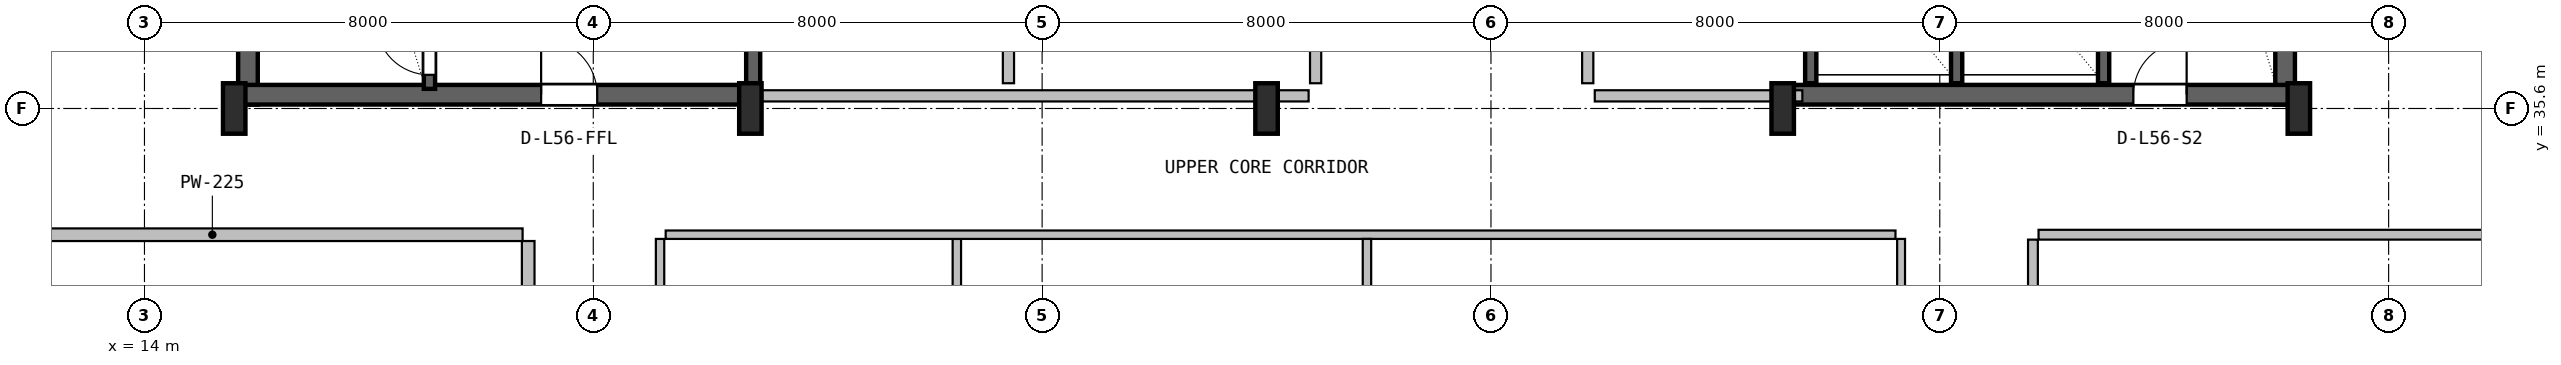
"""IFC4 building model, lengths in metres.
Left out: names, types, materials, properties, quantities, classifications, styles, units other than length and angle.
Written with IfcOpenShell. Run it as: python <this file> out.ifc"""

import sys

from ifc_helpers import new_model, si_unit, direction, frame, frame_2d, origin, origin_2d, place, context, subcontext, project, spatial, rectangle, i_section, extrude, source, transform, mapped, element, fill, save


model = new_model("IFC4")
c1 = context("Model", 3, precision=1e-05, world=origin(), true_north=direction((0.0, 1.0)))
c2 = subcontext(c1, "Body", "Model", "MODEL_VIEW")
j1 = project(units=[si_unit("LENGTHUNIT", "METRE"), si_unit("PLANEANGLEUNIT", "RADIAN")], contexts=[c1])
p1 = place(None, origin())
s1 = spatial("IfcSite", under=j1, at=p1, CompositionType="ELEMENT")
p2 = place(p1, origin())
s2 = spatial("IfcBuilding", under=s1, at=p2, CompositionType="ELEMENT")
p3 = place(p2, frame((0.0, 0.0, 226.4)))
s3 = spatial("IfcBuildingStorey", under=s2, at=p3, CompositionType="ELEMENT", Elevation=226.4)
for number, where, z_axis, x_axis in (
    (1, (15.845, 35.67, 0.0), (0.0, 0.0, 1.0), (0.0, 1.0, 0.0)),
    (2, (52.155, 35.67, 0.0), (0.0, 0.0, 1.0), (0.0, 1.0, 0.0)),
):
    element("IfcWall", number, at=place(p3, frame(where, z_axis=z_axis, x_axis=x_axis)), inside=s3, PredefinedType="SHEAR", context=c2, shape_type="SweptSolid", body=[
        extrude(rectangle(XDim=11.13, YDim=0.35, at=frame_2d((5.565, 0.0))), origin(), (0.0, 0.0, 1.0), 3.55),
    ])
p4 = place(p3, frame((15.67, 35.845, 0.0), z_axis=(0.0, 0.0, 1.0), x_axis=(1.0, 0.0, 0.0)))
e3 = element("IfcWall", 3, at=p4, inside=s3, PredefinedType="SHEAR", context=c2, shape_type="SweptSolid", body=[
    extrude(rectangle(XDim=9.13, YDim=0.35, at=frame_2d((4.565, 0.0))), origin(), (0.0, 0.0, 1.0), 3.55),
])
p5 = place(p4, frame((5.4, 0.0, 0.0)))
e4 = element("IfcOpeningElement", 4, at=p5, cuts=e3, PredefinedType="OPENING", context=c2, shape_type="SweptSolid", body=[
    extrude(rectangle(XDim=1.0, YDim=2.1, at=frame_2d((0.5, 1.05))), frame((0.0, 0.185, 0.0), z_axis=(0.0, -1.0, 0.0), x_axis=(1.0, 0.0, 0.0)), (0.0, 0.0, 1.0), 0.37),
])
p6 = place(p3, frame((43.2, 35.845, 0.0), z_axis=(0.0, 0.0, 1.0), x_axis=(1.0, 0.0, 0.0)))
e5 = element("IfcWall", 5, at=p6, inside=s3, PredefinedType="SHEAR", context=c2, shape_type="SweptSolid", body=[
    extrude(rectangle(XDim=9.13, YDim=0.35, at=frame_2d((4.565, 0.0))), origin(), (0.0, 0.0, 1.0), 3.55),
])
p7 = place(p6, frame((6.25, 0.0, 0.0)))
e6 = element("IfcOpeningElement", 6, at=p7, cuts=e5, PredefinedType="OPENING", context=c2, shape_type="SweptSolid", body=[
    extrude(rectangle(XDim=0.95, YDim=2.1, at=frame_2d((0.475, 1.05))), frame((0.0, 0.185, 0.0), z_axis=(0.0, -1.0, 0.0), x_axis=(1.0, 0.0, 0.0)), (0.0, 0.0, 1.0), 0.37),
])
m1 = source(origin(), c2, "Body", "SweptSolid", [
    extrude(i_section(OverallWidth=0.4, OverallDepth=0.9, WebThickness=0.016, FlangeThickness=0.028, FilletRadius=0.016, at=origin_2d()), origin(), (0.0, 0.0, 1.0), 3.8),
])
for number, where, z_axis, x_axis in (
    (7, (15.6, 35.6, 0.0), (0.0, 0.0, 1.0), (1.0, 0.0, 0.0)),
    (8, (24.8, 35.6, 0.0), (0.0, 0.0, 1.0), (1.0, 0.0, 0.0)),
    (9, (34.0, 35.6, 0.0), (0.0, 0.0, 1.0), (1.0, 0.0, 0.0)),
    (10, (43.2, 35.6, 0.0), (0.0, 0.0, 1.0), (1.0, 0.0, 0.0)),
    (11, (52.4, 35.6, 0.0), (0.0, 0.0, 1.0), (1.0, 0.0, 0.0)),
):
    element("IfcColumn", number, at=place(p3, frame(where, z_axis=z_axis, x_axis=x_axis)), inside=s3, PredefinedType="COLUMN", context=c2, shape_type="MappedRepresentation", body=[
        mapped(m1, transform((0.0, 0.0, 0.0), x_axis=(1.0, 0.0, 0.0), y_axis=(0.0, 1.0, 0.0), z_axis=(0.0, 0.0, 1.0), scale=1.0)),
    ])
p8 = place(p3, frame((19.08, 35.95, 0.0), z_axis=(0.0, 0.0, 1.0), x_axis=(0.0, 1.0, 0.0)))
e12 = element("IfcWall", 12, at=p8, inside=s3, PredefinedType="SHEAR", context=c2, shape_type="SweptSolid", body=[
    extrude(rectangle(XDim=9.65, YDim=0.2, at=frame_2d((4.825, 0.0))), origin(), (0.0, 0.0, 1.0), 3.55),
])
p9 = place(p8, frame((0.25, 0.0, 0.0)))
e13 = element("IfcOpeningElement", 13, at=p9, cuts=e12, PredefinedType="OPENING", context=c2, shape_type="SweptSolid", body=[
    extrude(rectangle(XDim=0.95, YDim=2.1, at=frame_2d((0.475, 1.05))), frame((0.0, 0.11, 0.0), z_axis=(0.0, -1.0, 0.0), x_axis=(1.0, 0.0, 0.0)), (0.0, 0.0, 1.0), 0.22),
])
p10 = place(p3, frame((24.85, 36.05, 0.0), z_axis=(0.0, 0.0, 1.0), x_axis=(0.0, 1.0, 0.0)))
e14 = element("IfcWall", 14, at=p10, inside=s3, PredefinedType="SHEAR", context=c2, shape_type="SweptSolid", body=[
    extrude(rectangle(XDim=10.45, YDim=0.25, at=frame_2d((5.225, 0.0))), origin(), (0.0, 0.0, 1.0), 3.55),
])
p11 = place(p3, frame((48.92, 36.05, 0.0), z_axis=(0.0, 0.0, 1.0), x_axis=(0.0, 1.0, 0.0)))
e15 = element("IfcWall", 15, at=p11, inside=s3, PredefinedType="SHEAR", context=c2, shape_type="SweptSolid", body=[
    extrude(rectangle(XDim=10.5, YDim=0.2, at=frame_2d((5.25, 0.0))), origin(), (0.0, 0.0, 1.0), 3.55),
])
for number, where, z_axis, x_axis in (
    (16, (43.7, 36.05, 0.0), (0.0, 0.0, 1.0), (0.0, 1.0, 0.0)),
    (17, (46.3, 36.05, 0.0), (0.0, 0.0, 1.0), (0.0, 1.0, 0.0)),
):
    element("IfcWall", number, at=place(p3, frame(where, z_axis=z_axis, x_axis=x_axis)), inside=s3, PredefinedType="SHEAR", context=c2, shape_type="SweptSolid", body=[
        extrude(rectangle(XDim=3.05, YDim=0.2, at=frame_2d((1.525, 0.0))), origin(), (0.0, 0.0, 1.0), 3.55),
    ])
p12 = place(p3, frame((25.0, 35.825, 0.0), z_axis=(0.0, 0.0, 1.0), x_axis=(1.0, 0.0, 0.0)))
e18 = element("IfcWall", 18, at=p12, inside=s3, PredefinedType="PLUMBINGWALL", context=c2, shape_type="SweptSolid", body=[
    extrude(rectangle(XDim=9.75, YDim=0.2, at=frame_2d((4.875, 0.0))), origin(), (0.0, 0.0, 1.0), 2.575),
])
for number, where, z_axis, x_axis in (
    (19, (29.4, 36.05, 0.0), (0.0, 0.0, 1.0), (0.0, 1.0, 0.0)),
    (20, (34.875, 36.05, 0.0), (0.0, 0.0, 1.0), (0.0, 1.0, 0.0)),
):
    element("IfcWall", number, at=place(p3, frame(where, z_axis=z_axis, x_axis=x_axis)), inside=s3, PredefinedType="PLUMBINGWALL", context=c2, shape_type="SweptSolid", body=[
        extrude(rectangle(XDim=3.1, YDim=0.2, at=frame_2d((1.55, 0.0))), origin(), (0.0, 0.0, 1.0), 3.53),
    ])
p13 = place(p3, frame((39.85, 35.825, 0.0), z_axis=(0.0, 0.0, 1.0), x_axis=(1.0, 0.0, 0.0)))
e21 = element("IfcWall", 21, at=p13, inside=s3, PredefinedType="SOLIDWALL", context=c2, shape_type="SweptSolid", body=[
    extrude(rectangle(XDim=3.7, YDim=0.2, at=frame_2d((1.85, 0.0))), origin(), (0.0, 0.0, 1.0), 2.575),
])
p14 = place(p3, frame((39.725, 36.05, 0.0), z_axis=(0.0, 0.0, 1.0), x_axis=(0.0, 1.0, 0.0)))
e22 = element("IfcWall", 22, at=p14, inside=s3, PredefinedType="SOLIDWALL", context=c2, shape_type="SweptSolid", body=[
    extrude(rectangle(XDim=3.1, YDim=0.2, at=frame_2d((1.55, 0.0))), origin(), (0.0, 0.0, 1.0), 3.53),
])
p15 = place(p3, frame((20.84, 16.188, 0.0), z_axis=(0.0, 0.0, 1.0), x_axis=(0.0, 1.0, 0.0)))
e23 = element("IfcWall", 23, at=p15, inside=s3, PredefinedType="PARTITIONING", context=c2, shape_type="SweptSolid", body=[
    extrude(rectangle(XDim=17.05, YDim=0.225, at=frame_2d((8.525, 0.0))), origin(), (0.0, 0.0, 1.0), 3.222),
])
p16 = place(p15, frame((7.831, 0.0, 0.0)))
e24 = element("IfcOpeningElement", 24, at=p16, cuts=e23, PredefinedType="OPENING", context=c2, shape_type="SweptSolid", body=[
    extrude(rectangle(XDim=1.4, YDim=2.12, at=frame_2d((0.7, 1.06))), frame((0.0, 0.123, 0.0), z_axis=(0.0, -1.0, 0.0), x_axis=(1.0, 0.0, 0.0)), (0.0, 0.0, 1.0), 0.245),
])
p17 = place(p3, frame((9.68, 33.35, 0.0), z_axis=(0.0, 0.0, 1.0), x_axis=(1.0, 0.0, 0.0)))
e25 = element("IfcWall", 25, at=p17, inside=s3, PredefinedType="PARTITIONING", context=c2, shape_type="SweptSolid", body=[
    extrude(rectangle(XDim=11.06, YDim=0.225, at=frame_2d((5.53, 0.0))), origin(), (0.0, 0.0, 1.0), 3.171),
])
p18 = place(p3, frame((28.48, 18.525, 0.0), z_axis=(0.0, 0.0, 1.0), x_axis=(0.0, 1.0, 0.0)))
e26 = element("IfcWall", 26, at=p18, inside=s3, PredefinedType="PARTITIONING", context=c2, shape_type="SweptSolid", body=[
    extrude(rectangle(XDim=14.75, YDim=0.15, at=frame_2d((7.375, 0.0))), origin(), (0.0, 0.0, 1.0), 2.908),
])
p19 = place(p3, frame((23.29, 33.35, 0.0), z_axis=(0.0, 0.0, 1.0), x_axis=(1.0, 0.0, 0.0)))
e27 = element("IfcWall", 27, at=p19, inside=s3, PredefinedType="PARTITIONING", context=c2, shape_type="SweptSolid", body=[
    extrude(rectangle(XDim=21.92, YDim=0.15, at=frame_2d((10.96, 0.0))), origin(), (0.0, 0.0, 1.0), 2.908),
])
p20 = place(p3, frame((23.19, 18.525, 0.0), z_axis=(0.0, 0.0, 1.0), x_axis=(0.0, 1.0, 0.0)))
e28 = element("IfcWall", 28, at=p20, inside=s3, PredefinedType="PARTITIONING", context=c2, shape_type="SweptSolid", body=[
    extrude(rectangle(XDim=14.75, YDim=0.15, at=frame_2d((7.375, 0.0))), origin(), (0.0, 0.0, 1.0), 3.222),
])
p21 = place(p20, frame((6.935, 0.0, 0.0)))
e29 = element("IfcOpeningElement", 29, at=p21, cuts=e28, PredefinedType="OPENING", context=c2, shape_type="SweptSolid", body=[
    extrude(rectangle(XDim=0.88, YDim=2.06, at=frame_2d((0.44, 1.03))), frame((0.0, 0.085, 0.0), z_axis=(0.0, -1.0, 0.0), x_axis=(1.0, 0.0, 0.0)), (0.0, 0.0, 1.0), 0.17),
])
p22 = place(p3, frame((35.79, 18.525, 0.0), z_axis=(0.0, 0.0, 1.0), x_axis=(0.0, 1.0, 0.0)))
e30 = element("IfcWall", 30, at=p22, inside=s3, PredefinedType="PARTITIONING", context=c2, shape_type="SweptSolid", body=[
    extrude(rectangle(XDim=14.75, YDim=0.15, at=frame_2d((7.375, 0.0))), origin(), (0.0, 0.0, 1.0), 2.908),
])
p23 = place(p3, frame((45.31, 18.525, 0.0), z_axis=(0.0, 0.0, 1.0), x_axis=(0.0, 1.0, 0.0)))
e31 = element("IfcWall", 31, at=p23, inside=s3, PredefinedType="PARTITIONING", context=c2, shape_type="SweptSolid", body=[
    extrude(rectangle(XDim=14.75, YDim=0.14, at=frame_2d((7.375, 0.0))), origin(), (0.0, 0.0, 1.0), 3.222),
])
p24 = place(p23, frame((6.875, 0.0, 0.0)))
e32 = element("IfcOpeningElement", 32, at=p24, cuts=e31, PredefinedType="OPENING", context=c2, shape_type="SweptSolid", body=[
    extrude(rectangle(XDim=1.0, YDim=2.1, at=frame_2d((0.5, 1.05))), frame((0.0, 0.08, 0.0), z_axis=(0.0, -1.0, 0.0), x_axis=(1.0, 0.0, 0.0)), (0.0, 0.0, 1.0), 0.16),
])
p25 = place(p3, frame((47.76, 33.35, 0.0), z_axis=(0.0, 0.0, 1.0), x_axis=(1.0, 0.0, 0.0)))
e33 = element("IfcWall", 33, at=p25, inside=s3, PredefinedType="PARTITIONING", context=c2, shape_type="SweptSolid", body=[
    extrude(rectangle(XDim=10.56, YDim=0.175, at=frame_2d((5.28, 0.0))), origin(), (0.0, 0.0, 1.0), 3.171),
])
p26 = place(p3, frame((47.66, 16.188, 0.0), z_axis=(0.0, 0.0, 1.0), x_axis=(0.0, 1.0, 0.0)))
e34 = element("IfcWall", 34, at=p26, inside=s3, PredefinedType="PARTITIONING", context=c2, shape_type="SweptSolid", body=[
    extrude(rectangle(XDim=17.075, YDim=0.175, at=frame_2d((8.538, 0.0))), origin(), (0.0, 0.0, 1.0), 3.222),
])
p27 = place(p26, frame((8.012, 0.0, 0.0)))
e35 = element("IfcOpeningElement", 35, at=p27, cuts=e34, PredefinedType="OPENING", context=c2, shape_type="SweptSolid", body=[
    extrude(rectangle(XDim=1.05, YDim=2.1, at=frame_2d((0.525, 1.05))), frame((0.0, 0.098, 0.0), z_axis=(0.0, -1.0, 0.0), x_axis=(1.0, 0.0, 0.0)), (0.0, 0.0, 1.0), 0.195),
])
m2 = source(origin(), c2, "Body", "SweptSolid", [
    extrude(rectangle(XDim=0.95, YDim=2.1, at=frame_2d((0.475, 1.05))), frame((0.0, 0.025, 0.0), z_axis=(0.0, -1.0, 0.0), x_axis=(1.0, 0.0, 0.0)), (0.0, 0.0, 1.0), 0.05),
])
p28 = place(p9, origin())
e36 = element("IfcDoor", 36, at=p28, inside=s3, OperationType="SINGLE_SWING_RIGHT", PredefinedType="DOOR", context=c2, shape_type="MappedRepresentation", body=[
    mapped(m2, transform((0.0, 0.0, 0.0), x_axis=(1.0, 0.0, 0.0), y_axis=(0.0, 1.0, 0.0), z_axis=(0.0, 0.0, 1.0), scale=1.0)),
])
fill(e13, e36)
m3 = source(origin(), c2, "Body", "SweptSolid", [
    extrude(rectangle(XDim=1.0, YDim=2.1, at=frame_2d((0.5, 1.05))), frame((0.0, 0.025, 0.0), z_axis=(0.0, -1.0, 0.0), x_axis=(1.0, 0.0, 0.0)), (0.0, 0.0, 1.0), 0.05),
])
p29 = place(p5, origin())
e37 = element("IfcDoor", 37, at=p29, inside=s3, OperationType="SINGLE_SWING_LEFT", PredefinedType="DOOR", context=c2, shape_type="MappedRepresentation", body=[
    mapped(m3, transform((0.0, 0.0, 0.0), x_axis=(1.0, 0.0, 0.0), y_axis=(0.0, 1.0, 0.0), z_axis=(0.0, 0.0, 1.0), scale=1.0)),
])
fill(e4, e37)
p30 = place(p7, origin())
e38 = element("IfcDoor", 38, at=p30, inside=s3, OperationType="SINGLE_SWING_RIGHT", PredefinedType="DOOR", context=c2, shape_type="MappedRepresentation", body=[
    mapped(m2, transform((0.0, 0.0, 0.0), x_axis=(1.0, 0.0, 0.0), y_axis=(0.0, 1.0, 0.0), z_axis=(0.0, 0.0, 1.0), scale=1.0)),
])
fill(e6, e38)
save(model, sys.argv[1])
